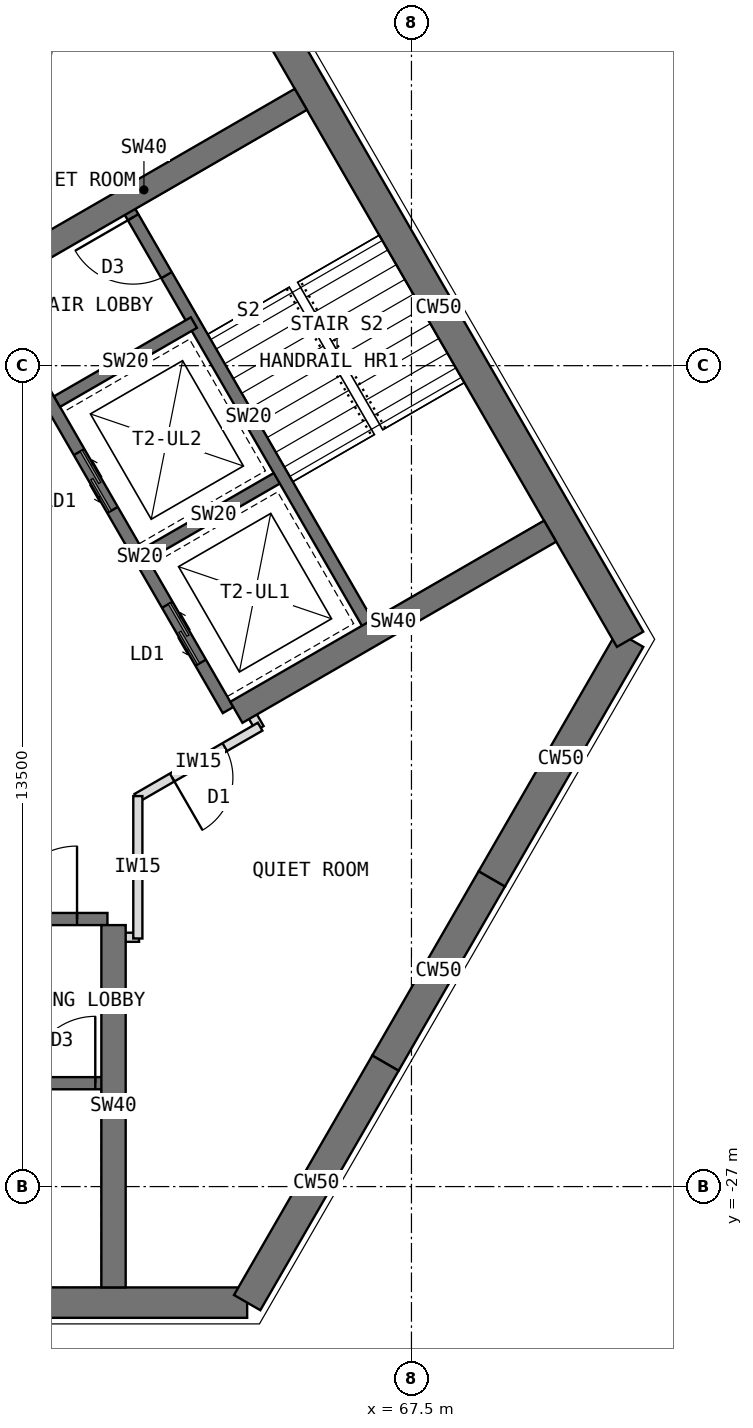
"""IFC4 building model, lengths in metres.
Left out: names, types, materials, properties, quantities, classifications, styles, units other than length and angle.
Written with IfcOpenShell. Run it as: python <this file> out.ifc"""

import sys

from ifc_helpers import new_model, si_unit, direction, frame, frame_2d, origin, place, context, subcontext, project, spatial, rectangle, extrude, element, fill, save


model = new_model("IFC4")
c1 = context("Model", 3, precision=1e-05, world=origin(), true_north=direction((0.0, 1.0)))
c2 = subcontext(c1, "Body", "Model", "MODEL_VIEW")
j1 = project(units=[si_unit("LENGTHUNIT", "METRE"), si_unit("PLANEANGLEUNIT", "RADIAN")], contexts=[c1])
p1 = place(None, origin())
s1 = spatial("IfcSite", under=j1, at=p1, CompositionType="ELEMENT")
p2 = place(p1, origin())
s2 = spatial("IfcBuilding", under=s1, at=p2, CompositionType="ELEMENT")
p3 = place(p2, frame((0.0, 0.0, 230.5)))
s3 = spatial("IfcBuildingStorey", under=s2, at=p3, CompositionType="ELEMENT", Elevation=230.5)
p4 = place(p3, frame((52.202, -28.908, 0.0), z_axis=(0.0, 0.0, 1.0), x_axis=(1.0, 0.0, 0.0)))
e1 = element("IfcWall", 1, at=p4, inside=s3, PredefinedType="SHEAR", context=c2, shape_type="SweptSolid", body=[
    extrude(rectangle(XDim=12.596, YDim=0.5, at=frame_2d((6.298, 0.0))), origin(), (0.0, 0.0, 1.0), 4.0),
])
p5 = place(p3, frame((64.798, -28.908, 0.0), z_axis=(0.0, 0.0, 1.0), x_axis=(0.499984222037, 0.866034513004, 0.0)))
e2 = element("IfcWall", 2, at=p5, inside=s3, PredefinedType="SHEAR", context=c2, shape_type="SweptSolid", body=[
    extrude(rectangle(XDim=4.548, YDim=0.5, at=frame_2d((2.274, 0.0))), origin(), (0.0, 0.0, 1.0), 4.0),
])
p6 = place(p3, frame((67.072, -24.97, 0.0), z_axis=(0.0, 0.0, 1.0), x_axis=(0.500010275428, 0.866019471182, 0.0)))
e3 = element("IfcWall", 3, at=p6, inside=s3, PredefinedType="SHEAR", context=c2, shape_type="SweptSolid", body=[
    extrude(rectangle(XDim=3.5, YDim=0.5, at=frame_2d((1.75, 0.0))), origin(), (0.0, 0.0, 1.0), 4.0),
])
p7 = place(p3, frame((68.822, -21.939, 0.0), z_axis=(0.0, 0.0, 1.0), x_axis=(0.500024481964, 0.866011268655, 0.0)))
e4 = element("IfcWall", 4, at=p7, inside=s3, PredefinedType="SHEAR", context=c2, shape_type="SweptSolid", body=[
    extrude(rectangle(XDim=4.548, YDim=0.5, at=frame_2d((2.274, 0.0))), origin(), (0.0, 0.0, 1.0), 4.0),
])
p8 = place(p3, frame((71.096, -18.0, 0.0), z_axis=(0.0, 0.0, 1.0), x_axis=(-0.500005998175, 0.866021940709, 0.0)))
e5 = element("IfcWall", 5, at=p8, inside=s3, PredefinedType="SHEAR", context=c2, shape_type="SweptSolid", body=[
    extrude(rectangle(XDim=12.596, YDim=0.5, at=frame_2d((6.298, 0.0))), origin(), (0.0, 0.0, 1.0), 4.0),
])
p9 = place(p3, frame((54.5, -22.6, 0.0), z_axis=(0.0, 0.0, 1.0), x_axis=(1.0, 0.0, 0.0)))
e6 = element("IfcWall", 6, at=p9, inside=s3, PredefinedType="SHEAR", context=c2, shape_type="SweptSolid", body=[
    extrude(rectangle(XDim=8.0, YDim=0.2, at=frame_2d((4.0, 0.0))), origin(), (0.0, 0.0, 1.0), 4.0),
])
p10 = place(p9, frame((6.3, 0.0, 0.0)))
e7 = element("IfcOpeningElement", 7, at=p10, cuts=e6, PredefinedType="OPENING", context=c2, shape_type="SweptSolid", body=[
    extrude(rectangle(XDim=1.2, YDim=2.1, at=frame_2d((0.6, 1.05))), frame((0.0, 0.11, 0.0), z_axis=(0.0, -1.0, 0.0), x_axis=(1.0, 0.0, 0.0)), (0.0, 0.0, 1.0), 0.22),
])
p11 = place(p9, frame((0.9, 0.0, 0.0)))
e8 = element("IfcOpeningElement", 8, at=p11, cuts=e6, PredefinedType="OPENING", context=c2, shape_type="SweptSolid", body=[
    extrude(rectangle(XDim=1.1, YDim=2.2, at=frame_2d((0.55, 1.1))), frame((0.0, 0.11, 0.0), z_axis=(0.0, -1.0, 0.0), x_axis=(1.0, 0.0, 0.0)), (0.0, 0.0, 1.0), 0.22),
])
p12 = place(p3, frame((54.5, -25.3, 0.0), z_axis=(0.0, 0.0, 1.0), x_axis=(1.0, 0.0, 0.0)))
e9 = element("IfcWall", 9, at=p12, inside=s3, PredefinedType="SHEAR", context=c2, shape_type="SweptSolid", body=[
    extrude(rectangle(XDim=8.0, YDim=0.2, at=frame_2d((4.0, 0.0))), origin(), (0.0, 0.0, 1.0), 4.0),
])
p13 = place(p12, frame((6.7, 0.0, 0.0)))
e10 = element("IfcOpeningElement", 10, at=p13, cuts=e9, PredefinedType="OPENING", context=c2, shape_type="SweptSolid", body=[
    extrude(rectangle(XDim=1.1, YDim=2.1, at=frame_2d((0.55, 1.05))), frame((0.0, 0.11, 0.0), z_axis=(0.0, -1.0, 0.0), x_axis=(1.0, 0.0, 0.0)), (0.0, 0.0, 1.0), 0.22),
])
p14 = place(p3, frame((62.6, -22.7, 0.0), z_axis=(0.0, 0.0, 1.0), x_axis=(0.0, -1.0, 0.0)))
e11 = element("IfcWall", 11, at=p14, inside=s3, PredefinedType="SHEAR", context=c2, shape_type="SweptSolid", body=[
    extrude(rectangle(XDim=5.958, YDim=0.4, at=frame_2d((2.979, 0.0))), origin(), (0.0, 0.0, 1.0), 4.0),
])
p15 = place(p3, frame((64.484, -19.164, 0.0), z_axis=(0.0, 0.0, 1.0), x_axis=(-0.49999894854, 0.866026010844, 0.0)))
e12 = element("IfcWall", 12, at=p15, inside=s3, PredefinedType="SHEAR", context=c2, shape_type="SweptSolid", body=[
    extrude(rectangle(XDim=8.0, YDim=0.2, at=frame_2d((4.0, 0.0))), origin(), (0.0, 0.0, 1.0), 4.0),
])
p16 = place(p15, frame((6.3, 0.0, 0.0)))
e13 = element("IfcOpeningElement", 13, at=p16, cuts=e12, PredefinedType="OPENING", context=c2, shape_type="SweptSolid", body=[
    extrude(rectangle(XDim=1.2, YDim=2.1, at=frame_2d((0.6, 1.05))), frame((0.0, 0.11, 0.0), z_axis=(0.0, -1.0, 0.0), x_axis=(1.0, 0.0, 0.0)), (0.0, 0.0, 1.0), 0.22),
])
p17 = place(p15, frame((0.9, 0.0, 0.0)))
e14 = element("IfcOpeningElement", 14, at=p17, cuts=e12, PredefinedType="OPENING", context=c2, shape_type="SweptSolid", body=[
    extrude(rectangle(XDim=1.1, YDim=2.2, at=frame_2d((0.55, 1.1))), frame((0.0, 0.11, 0.0), z_axis=(0.0, -1.0, 0.0), x_axis=(1.0, 0.0, 0.0)), (0.0, 0.0, 1.0), 0.22),
])
p18 = place(p15, frame((3.8, 0.0, 0.0)))
e15 = element("IfcOpeningElement", 15, at=p18, cuts=e12, PredefinedType="OPENING", context=c2, shape_type="SweptSolid", body=[
    extrude(rectangle(XDim=1.1, YDim=2.2, at=frame_2d((0.55, 1.1))), frame((0.0, 0.11, 0.0), z_axis=(0.0, -1.0, 0.0), x_axis=(1.0, 0.0, 0.0)), (0.0, 0.0, 1.0), 0.22),
])
p19 = place(p3, frame((63.12, -16.603, 0.0), z_axis=(0.0, 0.0, 1.0), x_axis=(0.866062058628, 0.499936506574, 0.0)))
e16 = element("IfcWall", 16, at=p19, inside=s3, PredefinedType="SHEAR", context=c2, shape_type="SweptSolid", body=[
    extrude(rectangle(XDim=2.6, YDim=0.2, at=frame_2d((1.3, 0.0))), origin(), (0.0, 0.0, 1.0), 4.0),
])
p20 = place(p3, frame((61.67, -14.091, 0.0), z_axis=(0.0, 0.0, 1.0), x_axis=(0.86603858612, 0.49997716683, 0.0)))
e17 = element("IfcWall", 17, at=p20, inside=s3, PredefinedType="SHEAR", context=c2, shape_type="SweptSolid", body=[
    extrude(rectangle(XDim=2.6, YDim=0.2, at=frame_2d((1.3, 0.0))), origin(), (0.0, 0.0, 1.0), 4.0),
])
p21 = place(p3, frame((66.822, -17.814, 0.0), z_axis=(0.0, 0.0, 1.0), x_axis=(-0.49999894854, 0.866026010844, 0.0)))
e18 = element("IfcWall", 18, at=p21, inside=s3, PredefinedType="SHEAR", context=c2, shape_type="SweptSolid", body=[
    extrude(rectangle(XDim=8.0, YDim=0.2, at=frame_2d((4.0, 0.0))), origin(), (0.0, 0.0, 1.0), 4.0),
])
p22 = place(p21, frame((6.7, 0.0, 0.0)))
e19 = element("IfcOpeningElement", 19, at=p22, cuts=e18, PredefinedType="OPENING", context=c2, shape_type="SweptSolid", body=[
    extrude(rectangle(XDim=1.1, YDim=2.1, at=frame_2d((0.55, 1.05))), frame((0.0, 0.11, 0.0), z_axis=(0.0, -1.0, 0.0), x_axis=(1.0, 0.0, 0.0)), (0.0, 0.0, 1.0), 0.22),
])
p23 = place(p3, frame((60.52, -12.099, 0.0), z_axis=(0.0, 0.0, 1.0), x_axis=(0.86602319114, 0.500003832394, 0.0)))
e20 = element("IfcWall", 20, at=p23, inside=s3, PredefinedType="SHEAR", context=c2, shape_type="SweptSolid", body=[
    extrude(rectangle(XDim=5.958, YDim=0.4, at=frame_2d((2.979, 0.0))), origin(), (0.0, 0.0, 1.0), 4.0),
])
p24 = place(p3, frame((64.62, -19.201, 0.0), z_axis=(0.0, 0.0, 1.0), x_axis=(0.866012946976, 0.500021575205, 0.0)))
e21 = element("IfcWall", 21, at=p24, inside=s3, PredefinedType="SHEAR", context=c2, shape_type="SweptSolid", body=[
    extrude(rectangle(XDim=5.958, YDim=0.4, at=frame_2d((2.979, 0.0))), origin(), (0.0, 0.0, 1.0), 4.0),
])
for number, where, z_axis, x_axis in (
    (22, (63.02, -22.9, 0.0), (0.0, 0.0, 1.0), (-1.0, 0.0, 0.0)),
    (23, (64.789, -19.092, 0.0), (0.0, 0.0, 1.0), (0.5, -0.866, 0.0)),
):
    element("IfcWall", number, at=place(p3, frame(where, z_axis=z_axis, x_axis=x_axis)), inside=s3, PredefinedType="PARTITIONING", context=c2, shape_type="SweptSolid", body=[
        extrude(rectangle(XDim=0.43, YDim=0.15, at=frame_2d((0.215, 0.0))), origin(), (0.0, 0.0, 1.0), 3.8),
    ])
p25 = place(p3, frame((65.011, -19.437, 0.0), z_axis=(0.0, 0.0, 1.0), x_axis=(-0.865982457891, -0.500074377092, 0.0)))
e24 = element("IfcWall", 24, at=p25, inside=s3, PredefinedType="PARTITIONING", context=c2, shape_type="SweptSolid", body=[
    extrude(rectangle(XDim=2.342, YDim=0.15, at=frame_2d((1.171, 0.0))), origin(), (0.0, 0.0, 1.0), 3.8),
])
p26 = place(p25, frame((0.671, 0.0, 0.0)))
e25 = element("IfcOpeningElement", 25, at=p26, cuts=e24, PredefinedType="OPENING", context=c2, shape_type="SweptSolid", body=[
    extrude(rectangle(XDim=1.0, YDim=2.1, at=frame_2d((0.5, 1.05))), frame((0.0, 0.085, 0.0), z_axis=(0.0, -1.0, 0.0), x_axis=(1.0, 0.0, 0.0)), (0.0, 0.0, 1.0), 0.17),
])
p27 = place(p3, frame((63.0, -20.578, 0.0), z_axis=(0.0, 0.0, 1.0), x_axis=(0.0, -1.0, 0.0)))
e26 = element("IfcWall", 26, at=p27, inside=s3, PredefinedType="PARTITIONING", context=c2, shape_type="SweptSolid", body=[
    extrude(rectangle(XDim=2.342, YDim=0.15, at=frame_2d((1.171, 0.0))), origin(), (0.0, 0.0, 1.0), 3.8),
])
p28 = place(p10, origin())
e27 = element("IfcDoor", 27, at=p28, inside=s3, OperationType="SINGLE_SWING_RIGHT", PredefinedType="DOOR", context=c2, shape_type="SweptSolid", body=[
    extrude(rectangle(XDim=1.2, YDim=2.1, at=frame_2d((0.6, 1.05))), frame((0.0, 0.025, 0.0), z_axis=(0.0, -1.0, 0.0), x_axis=(1.0, 0.0, 0.0)), (0.0, 0.0, 1.0), 0.05),
])
fill(e7, e27)
p29 = place(p13, origin())
e28 = element("IfcDoor", 28, at=p29, inside=s3, OperationType="SINGLE_SWING_RIGHT", PredefinedType="DOOR", context=c2, shape_type="SweptSolid", body=[
    extrude(rectangle(XDim=1.1, YDim=2.1, at=frame_2d((0.55, 1.05))), frame((0.0, 0.025, 0.0), z_axis=(0.0, -1.0, 0.0), x_axis=(1.0, 0.0, 0.0)), (0.0, 0.0, 1.0), 0.05),
])
fill(e10, e28)
p30 = place(p17, origin())
e29 = element("IfcDoor", 29, at=p30, inside=s3, OperationType="DOUBLE_DOOR_SLIDING", PredefinedType="DOOR", context=c2, shape_type="SweptSolid", body=[
    extrude(rectangle(XDim=1.1, YDim=2.2, at=frame_2d((0.55, 1.1))), frame((0.0, 0.025, 0.0), z_axis=(0.0, -1.0, 0.0), x_axis=(1.0, 0.0, 0.0)), (0.0, 0.0, 1.0), 0.05),
])
fill(e14, e29)
p31 = place(p18, origin())
e30 = element("IfcDoor", 30, at=p31, inside=s3, OperationType="DOUBLE_DOOR_SLIDING", PredefinedType="DOOR", context=c2, shape_type="SweptSolid", body=[
    extrude(rectangle(XDim=1.1, YDim=2.2, at=frame_2d((0.55, 1.1))), frame((0.0, 0.025, 0.0), z_axis=(0.0, -1.0, 0.0), x_axis=(1.0, 0.0, 0.0)), (0.0, 0.0, 1.0), 0.05),
])
fill(e15, e30)
p32 = place(p22, origin())
e31 = element("IfcDoor", 31, at=p32, inside=s3, OperationType="SINGLE_SWING_RIGHT", PredefinedType="DOOR", context=c2, shape_type="SweptSolid", body=[
    extrude(rectangle(XDim=1.1, YDim=2.1, at=frame_2d((0.55, 1.05))), frame((0.0, 0.025, 0.0), z_axis=(0.0, -1.0, 0.0), x_axis=(1.0, 0.0, 0.0)), (0.0, 0.0, 1.0), 0.05),
])
fill(e19, e31)
p33 = place(p26, origin())
e32 = element("IfcDoor", 32, at=p33, inside=s3, OperationType="SINGLE_SWING_RIGHT", PredefinedType="DOOR", context=c2, shape_type="SweptSolid", body=[
    extrude(rectangle(XDim=1.0, YDim=2.1, at=frame_2d((0.5, 1.05))), frame((0.0, 0.025, 0.0), z_axis=(0.0, -1.0, 0.0), x_axis=(1.0, 0.0, 0.0)), (0.0, 0.0, 1.0), 0.05),
])
fill(e25, e32)
save(model, sys.argv[1])
